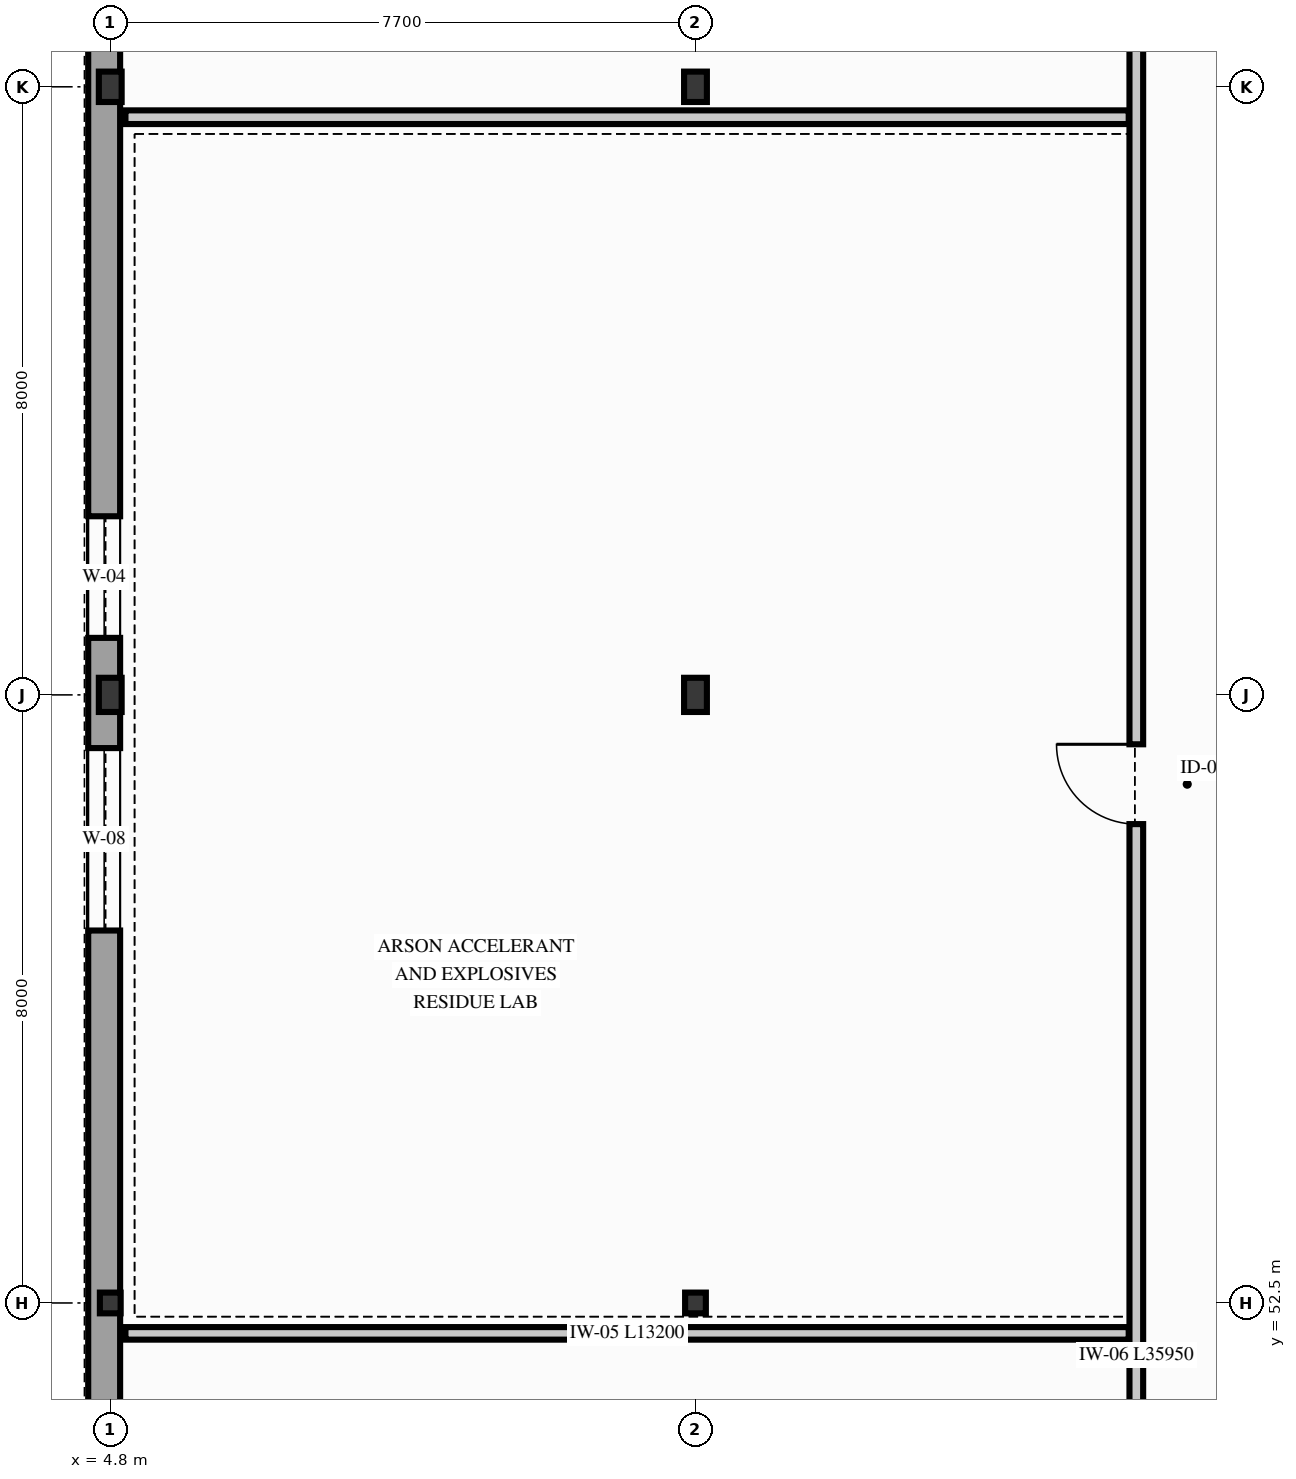
"""IFC4 building model, lengths in metres.
Left out: names, types, materials, properties, quantities, classifications, styles, units other than length and angle.
Written with IfcOpenShell. Run it as: python <this file> out.ifc"""

import sys

from ifc_helpers import new_model, si_unit, direction, frame, frame_2d, origin, origin_2d, place, context, subcontext, project, spatial, rectangle, hollow_circle, i_section, extrude, element, fill, save


model = new_model("IFC4")
c1 = context("Model", 3, precision=1e-05, world=origin(), true_north=direction((0.0, 1.0)))
c2 = subcontext(c1, "Body", "Model", "MODEL_VIEW")
j1 = project(units=[si_unit("LENGTHUNIT", "METRE"), si_unit("PLANEANGLEUNIT", "RADIAN")], contexts=[c1])
p1 = place(None, origin())
s1 = spatial("IfcSite", under=j1, at=p1, CompositionType="ELEMENT")
p2 = place(p1, origin())
s2 = spatial("IfcBuilding", under=s1, at=p2, CompositionType="ELEMENT")
p3 = place(p2, frame((0.0, 0.0, 13.5)))
s3 = spatial("IfcBuildingStorey", under=s2, at=p3, CompositionType="ELEMENT", Elevation=13.5)
p4 = place(p3, frame((4.8, 52.5, 0.0), z_axis=(0.0, 0.0, 1.0), x_axis=(1.0, 0.0, 0.0)))
e1 = element("IfcColumn", 1, at=p4, inside=s3, PredefinedType="COLUMN", context=c2, shape_type="SweptSolid", body=[
    extrude(hollow_circle(Radius=0.136, WallThickness=0.012, at=origin_2d()), origin(), (0.0, 0.0, 1.0), 4.2),
])
p5 = place(p3, frame((4.8, 60.5, 0.0), z_axis=(0.0, 0.0, 1.0), x_axis=(1.0, 0.0, 0.0)))
e2 = element("IfcColumn", 2, at=p5, inside=s3, PredefinedType="COLUMN", context=c2, shape_type="SweptSolid", body=[
    extrude(i_section(OverallWidth=0.3, OverallDepth=0.45, WebThickness=0.014, FlangeThickness=0.026, FilletRadius=0.027, at=origin_2d()), origin(), (0.0, 0.0, 1.0), 4.2),
])
p6 = place(p3, frame((4.8, 68.5, 0.0), z_axis=(0.0, 0.0, 1.0), x_axis=(1.0, 0.0, 0.0)))
e3 = element("IfcColumn", 3, at=p6, inside=s3, PredefinedType="COLUMN", context=c2, shape_type="SweptSolid", body=[
    extrude(i_section(OverallWidth=0.3, OverallDepth=0.4, WebThickness=0.013, FlangeThickness=0.024, FilletRadius=0.027, at=origin_2d()), origin(), (0.0, 0.0, 1.0), 4.2),
])
p7 = place(p3, frame((12.5, 52.5, 0.0), z_axis=(0.0, 0.0, 1.0), x_axis=(1.0, 0.0, 0.0)))
e4 = element("IfcColumn", 4, at=p7, inside=s3, PredefinedType="COLUMN", context=c2, shape_type="SweptSolid", body=[
    extrude(hollow_circle(Radius=0.136, WallThickness=0.012, at=origin_2d()), origin(), (0.0, 0.0, 1.0), 4.2),
])
p8 = place(p3, frame((12.5, 60.5, 0.0), z_axis=(0.0, 0.0, 1.0), x_axis=(1.0, 0.0, 0.0)))
e5 = element("IfcColumn", 5, at=p8, inside=s3, PredefinedType="COLUMN", context=c2, shape_type="SweptSolid", body=[
    extrude(i_section(OverallWidth=0.3, OverallDepth=0.45, WebThickness=0.014, FlangeThickness=0.026, FilletRadius=0.027, at=origin_2d()), origin(), (0.0, 0.0, 1.0), 4.2),
])
p9 = place(p3, frame((12.5, 68.5, 0.0), z_axis=(0.0, 0.0, 1.0), x_axis=(1.0, 0.0, 0.0)))
e6 = element("IfcColumn", 6, at=p9, inside=s3, PredefinedType="COLUMN", context=c2, shape_type="SweptSolid", body=[
    extrude(i_section(OverallWidth=0.3, OverallDepth=0.4, WebThickness=0.013, FlangeThickness=0.024, FilletRadius=0.027, at=origin_2d()), origin(), (0.0, 0.0, 1.0), 4.2),
])
p10 = place(p3, frame((4.72, 36.5, 0.0), z_axis=(0.0, 0.0, 1.0), x_axis=(0.0, 1.0, 0.0)))
e7 = element("IfcWall", 7, at=p10, inside=s3, PredefinedType="SOLIDWALL", context=c2, shape_type="SweptSolid", body=[
    extrude(rectangle(XDim=47.0, YDim=0.42, at=frame_2d((23.5, 0.0))), origin(), (0.0, 0.0, 1.0), 3.72),
])
p11 = place(p10, frame((1.65, 0.0, 0.74)))
e8 = element("IfcOpeningElement", 8, at=p11, cuts=e7, PredefinedType="OPENING", context=c2, shape_type="SweptSolid", body=[
    extrude(rectangle(XDim=1.6, YDim=2.4, at=frame_2d((0.8, 1.2))), frame((0.0, 0.22, 0.0), z_axis=(0.0, -1.0, 0.0), x_axis=(1.0, 0.0, 0.0)), (0.0, 0.0, 1.0), 0.44),
])
p12 = place(p10, frame((5.5, 0.0, 0.74)))
e9 = element("IfcOpeningElement", 9, at=p12, cuts=e7, PredefinedType="OPENING", context=c2, shape_type="SweptSolid", body=[
    extrude(rectangle(XDim=1.8, YDim=2.4, at=frame_2d((0.9, 1.2))), frame((0.0, 0.22, 0.0), z_axis=(0.0, -1.0, 0.0), x_axis=(1.0, 0.0, 0.0)), (0.0, 0.0, 1.0), 0.44),
])
p13 = place(p10, frame((9.35, 0.0, 0.84)))
e10 = element("IfcOpeningElement", 10, at=p13, cuts=e7, PredefinedType="OPENING", context=c2, shape_type="SweptSolid", body=[
    extrude(rectangle(XDim=1.5, YDim=2.3, at=frame_2d((0.75, 1.15))), frame((0.0, 0.22, 0.0), z_axis=(0.0, -1.0, 0.0), x_axis=(1.0, 0.0, 0.0)), (0.0, 0.0, 1.0), 0.44),
])
p14 = place(p10, frame((20.9, 0.0, 0.74)))
e11 = element("IfcOpeningElement", 11, at=p14, cuts=e7, PredefinedType="OPENING", context=c2, shape_type="SweptSolid", body=[
    extrude(rectangle(XDim=2.4, YDim=2.4, at=frame_2d((1.2, 1.2))), frame((0.0, 0.22, 0.0), z_axis=(0.0, -1.0, 0.0), x_axis=(1.0, 0.0, 0.0)), (0.0, 0.0, 1.0), 0.44),
])
p15 = place(p10, frame((24.75, 0.0, 0.74)))
e12 = element("IfcOpeningElement", 12, at=p15, cuts=e7, PredefinedType="OPENING", context=c2, shape_type="SweptSolid", body=[
    extrude(rectangle(XDim=1.6, YDim=2.4, at=frame_2d((0.8, 1.2))), frame((0.0, 0.22, 0.0), z_axis=(0.0, -1.0, 0.0), x_axis=(1.0, 0.0, 0.0)), (0.0, 0.0, 1.0), 0.44),
])
p16 = place(p10, frame((40.15, 0.0, 0.54)))
e13 = element("IfcOpeningElement", 13, at=p16, cuts=e7, PredefinedType="OPENING", context=c2, shape_type="SweptSolid", body=[
    extrude(rectangle(XDim=2.2, YDim=2.6, at=frame_2d((1.1, 1.3))), frame((0.0, 0.22, 0.0), z_axis=(0.0, -1.0, 0.0), x_axis=(1.0, 0.0, 0.0)), (0.0, 0.0, 1.0), 0.44),
])
p17 = place(p3, frame((18.3, 36.8, 0.0), z_axis=(0.0, 0.0, 1.0), x_axis=(0.0, 1.0, 0.0)))
e14 = element("IfcWall", 14, at=p17, inside=s3, PredefinedType="PARTITIONING", context=c2, shape_type="SweptSolid", body=[
    extrude(rectangle(XDim=35.95, YDim=0.18, at=frame_2d((17.975, 0.0))), origin(), (0.0, 0.0, 1.0), 3.718),
])
p18 = place(p17, frame((7.0, 0.0, 0.0)))
e15 = element("IfcOpeningElement", 15, at=p18, cuts=e14, PredefinedType="OPENING", context=c2, shape_type="SweptSolid", body=[
    extrude(rectangle(XDim=1.02, YDim=2.18, at=frame_2d((0.51, 1.09))), frame((0.0, 0.1, 0.0), z_axis=(0.0, -1.0, 0.0), x_axis=(1.0, 0.0, 0.0)), (0.0, 0.0, 1.0), 0.2),
])
p19 = place(p17, frame((22.0, 0.0, 0.0)))
e16 = element("IfcOpeningElement", 16, at=p19, cuts=e14, PredefinedType="OPENING", context=c2, shape_type="SweptSolid", body=[
    extrude(rectangle(XDim=1.05, YDim=2.2, at=frame_2d((0.525, 1.1))), frame((0.0, 0.1, 0.0), z_axis=(0.0, -1.0, 0.0), x_axis=(1.0, 0.0, 0.0)), (0.0, 0.0, 1.0), 0.2),
])
p20 = place(p3, frame((5.0, 52.1, 0.0), z_axis=(0.0, 0.0, 1.0), x_axis=(1.0, 0.0, 0.0)))
e17 = element("IfcWall", 17, at=p20, inside=s3, PredefinedType="PARTITIONING", context=c2, shape_type="SweptSolid", body=[
    extrude(rectangle(XDim=13.2, YDim=0.165, at=frame_2d((6.6, 0.0))), origin(), (0.0, 0.0, 1.0), 3.598),
])
p21 = place(p3, frame((5.0, 68.1, 0.0), z_axis=(0.0, 0.0, 1.0), x_axis=(1.0, 0.0, 0.0)))
e18 = element("IfcWall", 18, at=p21, inside=s3, PredefinedType="PARTITIONING", context=c2, shape_type="SweptSolid", body=[
    extrude(rectangle(XDim=13.2, YDim=0.18, at=frame_2d((6.6, 0.0))), origin(), (0.0, 0.0, 1.0), 3.598),
])
p22 = place(p14, origin())
e19 = element("IfcWindow", 19, at=p22, inside=s3, PartitioningType="SINGLE_PANEL", PredefinedType="WINDOW", context=c2, shape_type="SweptSolid", body=[
    extrude(rectangle(XDim=2.4, YDim=2.4, at=frame_2d((1.2, 1.2))), frame((0.0, 0.03, 0.0), z_axis=(0.0, -1.0, 0.0), x_axis=(1.0, 0.0, 0.0)), (0.0, 0.0, 1.0), 0.06),
])
fill(e11, e19)
p23 = place(p15, origin())
e20 = element("IfcWindow", 20, at=p23, inside=s3, PartitioningType="SINGLE_PANEL", PredefinedType="WINDOW", context=c2, shape_type="SweptSolid", body=[
    extrude(rectangle(XDim=1.6, YDim=2.4, at=frame_2d((0.8, 1.2))), frame((0.0, 0.03, 0.0), z_axis=(0.0, -1.0, 0.0), x_axis=(1.0, 0.0, 0.0)), (0.0, 0.0, 1.0), 0.06),
])
fill(e12, e20)
p24 = place(p19, origin())
e21 = element("IfcDoor", 21, at=p24, inside=s3, OperationType="SINGLE_SWING_RIGHT", PredefinedType="DOOR", context=c2, shape_type="SweptSolid", body=[
    extrude(rectangle(XDim=1.05, YDim=2.2, at=frame_2d((0.525, 1.1))), frame((0.0, 0.025, 0.0), z_axis=(0.0, -1.0, 0.0), x_axis=(1.0, 0.0, 0.0)), (0.0, 0.0, 1.0), 0.05),
])
fill(e16, e21)
save(model, sys.argv[1])
